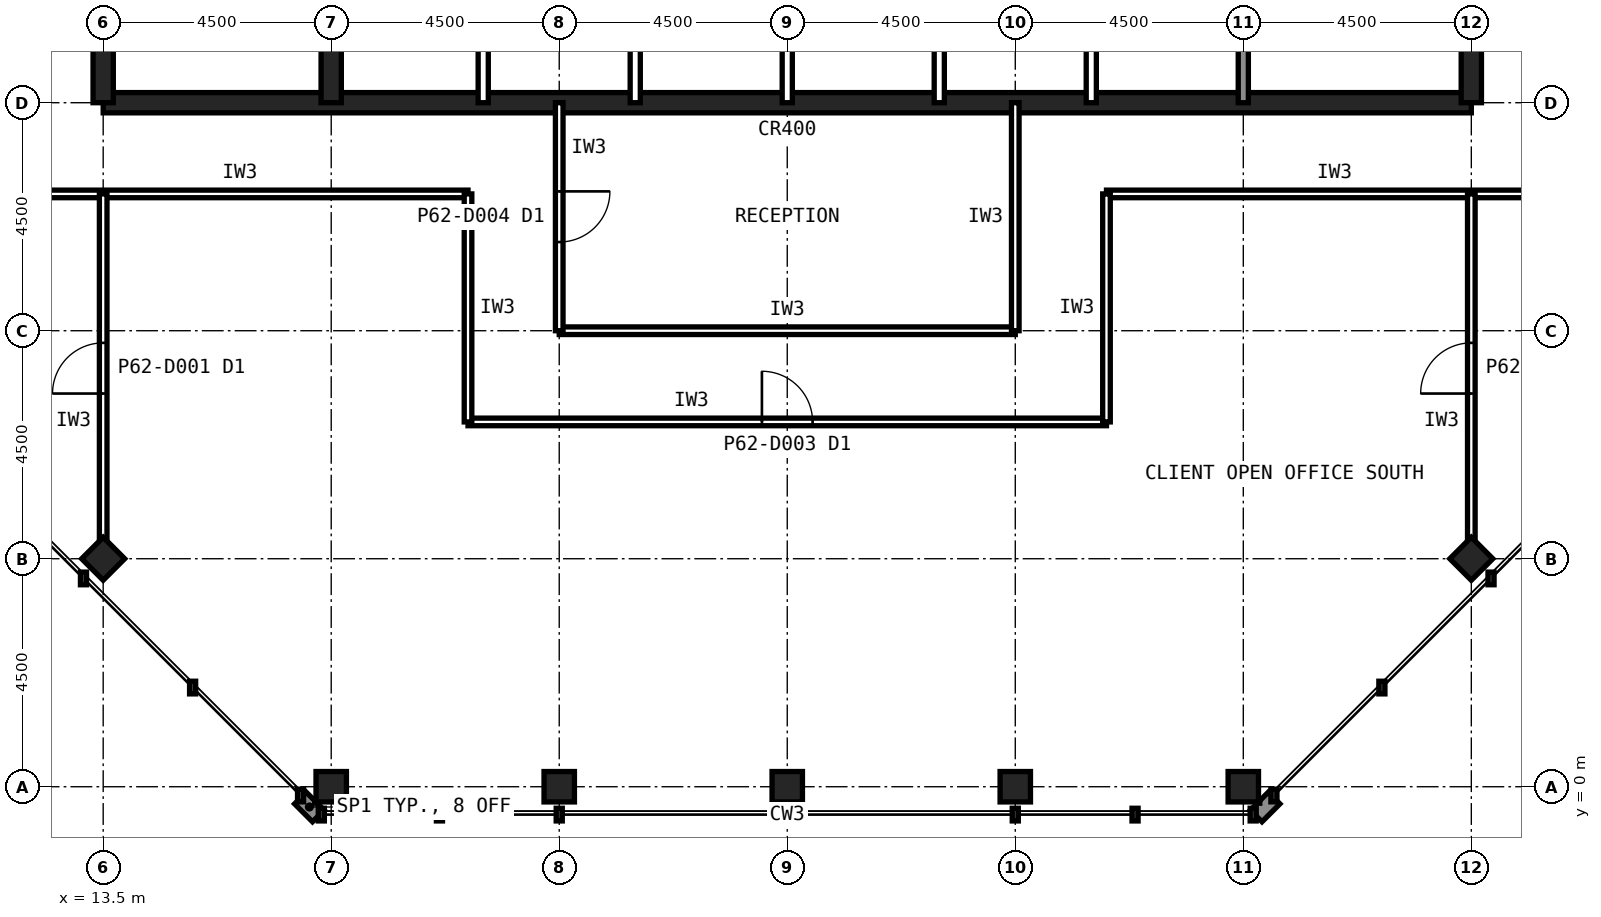
"""IFC4 building model, lengths in metres.
Left out: names, types, materials, properties, quantities, classifications, styles, units other than length and angle.
Written with IfcOpenShell. Run it as: python <this file> out.ifc"""

import sys

from ifc_helpers import new_model, si_unit, direction, frame, frame_2d, origin, origin_2d, place, context, subcontext, project, spatial, rectangle, hollow_rectangle, extrude, element, fill, save


model = new_model("IFC4")
c1 = context("Model", 3, precision=1e-05, world=origin(), true_north=direction((0.0, 1.0)))
c2 = subcontext(c1, "Body", "Model", "MODEL_VIEW")
j1 = project(units=[si_unit("LENGTHUNIT", "METRE"), si_unit("PLANEANGLEUNIT", "RADIAN")], contexts=[c1])
p1 = place(None, origin())
s1 = spatial("IfcSite", under=j1, at=p1, CompositionType="ELEMENT")
p2 = place(p1, origin())
s2 = spatial("IfcBuilding", under=s1, at=p2, CompositionType="ELEMENT")
p3 = place(p2, frame((0.0, 0.0, 262.6)))
s3 = spatial("IfcBuildingStorey", under=s2, at=p3, CompositionType="ELEMENT", Elevation=262.6)
for number, where, z_axis, x_axis in (
    (1, (18.0, 0.0, 0.0), (0.0, 0.0, 1.0), (1.0, 0.0, 0.0)),
    (2, (22.5, 0.0, 0.0), (0.0, 0.0, 1.0), (1.0, 0.0, 0.0)),
    (3, (27.0, 0.0, 0.0), (0.0, 0.0, 1.0), (1.0, 0.0, 0.0)),
    (4, (31.5, 0.0, 0.0), (0.0, 0.0, 1.0), (1.0, 0.0, 0.0)),
    (5, (36.0, 0.0, 0.0), (0.0, 0.0, 1.0), (1.0, 0.0, 0.0)),
    (6, (13.5, 4.5, 0.0), (0.0, 0.0, 1.0), (0.707, 0.707, 0.0)),
    (7, (40.5, 4.5, 0.0), (0.0, 0.0, 1.0), (0.707, 0.707, 0.0)),
):
    element("IfcColumn", number, at=place(p3, frame(where, z_axis=z_axis, x_axis=x_axis)), inside=s3, PredefinedType="COLUMN", context=c2, shape_type="SweptSolid", body=[
        extrude(hollow_rectangle(XDim=0.6, YDim=0.6, WallThickness=0.028, at=origin_2d()), origin(), (0.0, 0.0, 1.0), 4.0),
    ])
p4 = place(p3, frame((13.5, 13.5, 0.0), z_axis=(0.0, 0.0, 1.0), x_axis=(1.0, 0.0, 0.0)))
e8 = element("IfcWall", 8, at=p4, inside=s3, PredefinedType="SHEAR", context=c2, shape_type="SweptSolid", body=[
    extrude(rectangle(XDim=27.0, YDim=0.4, at=frame_2d((13.5, 0.0))), origin(), (0.0, 0.0, 1.0), 4.0),
])
p5 = place(p3, frame((40.5, 13.5, 0.0), z_axis=(0.0, 0.0, 1.0), x_axis=(0.0, 1.0, 0.0)))
e9 = element("IfcWall", 9, at=p5, inside=s3, PredefinedType="SHEAR", context=c2, shape_type="SweptSolid", body=[
    extrude(rectangle(XDim=27.0, YDim=0.4, at=frame_2d((13.5, 0.0))), origin(), (0.0, 0.0, 1.0), 4.0),
])
p6 = place(p5, frame((5.85, 0.0, 0.0)))
e10 = element("IfcOpeningElement", 10, at=p6, cuts=e9, PredefinedType="OPENING", context=c2, shape_type="SweptSolid", body=[
    extrude(rectangle(XDim=1.8, YDim=2.1, at=frame_2d((0.9, 1.05))), frame((0.0, 0.21, 0.0), z_axis=(0.0, -1.0, 0.0), x_axis=(1.0, 0.0, 0.0)), (0.0, 0.0, 1.0), 0.42),
])
p7 = place(p5, frame((19.65, 0.0, 0.0)))
e11 = element("IfcOpeningElement", 11, at=p7, cuts=e9, PredefinedType="OPENING", context=c2, shape_type="SweptSolid", body=[
    extrude(rectangle(XDim=1.2, YDim=2.1, at=frame_2d((0.6, 1.05))), frame((0.0, 0.21, 0.0), z_axis=(0.0, -1.0, 0.0), x_axis=(1.0, 0.0, 0.0)), (0.0, 0.0, 1.0), 0.42),
])
p8 = place(p3, frame((13.5, 40.5, 0.0), z_axis=(0.0, 0.0, 1.0), x_axis=(0.0, -1.0, 0.0)))
e12 = element("IfcWall", 12, at=p8, inside=s3, PredefinedType="SHEAR", context=c2, shape_type="SweptSolid", body=[
    extrude(rectangle(XDim=27.0, YDim=0.4, at=frame_2d((13.5, 0.0))), origin(), (0.0, 0.0, 1.0), 4.0),
])
p9 = place(p8, frame((19.65, 0.0, 0.0)))
e13 = element("IfcOpeningElement", 13, at=p9, cuts=e12, PredefinedType="OPENING", context=c2, shape_type="SweptSolid", body=[
    extrude(rectangle(XDim=1.2, YDim=2.1, at=frame_2d((0.6, 1.05))), frame((0.0, 0.21, 0.0), z_axis=(0.0, -1.0, 0.0), x_axis=(1.0, 0.0, 0.0)), (0.0, 0.0, 1.0), 0.42),
])
p10 = place(p8, frame((5.85, 0.0, 0.0)))
e14 = element("IfcOpeningElement", 14, at=p10, cuts=e12, PredefinedType="OPENING", context=c2, shape_type="SweptSolid", body=[
    extrude(rectangle(XDim=1.8, YDim=2.1, at=frame_2d((0.9, 1.05))), frame((0.0, 0.21, 0.0), z_axis=(0.0, -1.0, 0.0), x_axis=(1.0, 0.0, 0.0)), (0.0, 0.0, 1.0), 0.42),
])
p11 = place(p3, frame((18.0, 13.5, 0.0), z_axis=(0.0, 0.0, 1.0), x_axis=(0.0, 1.0, 0.0)))
e15 = element("IfcWall", 15, at=p11, inside=s3, PredefinedType="SHEAR", context=c2, shape_type="SweptSolid", body=[
    extrude(rectangle(XDim=18.0, YDim=0.4, at=frame_2d((9.0, 0.0))), origin(), (0.0, 0.0, 1.0), 4.0),
])
p12 = place(p3, frame((36.0, 13.5, 0.0), z_axis=(0.0, 0.0, 1.0), x_axis=(0.0, 1.0, 0.0)))
e16 = element("IfcWall", 16, at=p12, inside=s3, PredefinedType="SOLIDWALL", context=c2, shape_type="SweptSolid", body=[
    extrude(rectangle(XDim=4.5, YDim=0.2, at=frame_2d((2.25, 0.0))), origin(), (0.0, 0.0, 1.0), 3.84),
])
for number, where, z_axis, x_axis in (
    (17, (21.0, 13.5, 0.0), (0.0, 0.0, 1.0), (0.0, 1.0, 0.0)),
    (18, (24.0, 13.5, 0.0), (0.0, 0.0, 1.0), (0.0, 1.0, 0.0)),
    (19, (27.0, 13.5, 0.0), (0.0, 0.0, 1.0), (0.0, 1.0, 0.0)),
    (20, (30.0, 13.5, 0.0), (0.0, 0.0, 1.0), (0.0, 1.0, 0.0)),
    (21, (33.0, 13.5, 0.0), (0.0, 0.0, 1.0), (0.0, 1.0, 0.0)),
):
    element("IfcWall", number, at=place(p3, frame(where, z_axis=z_axis, x_axis=x_axis)), inside=s3, PredefinedType="PARTITIONING", context=c2, shape_type="SweptSolid", body=[
        extrude(rectangle(XDim=4.5, YDim=0.2, at=frame_2d((2.25, 0.0))), origin(), (0.0, 0.0, 1.0), 3.84),
    ])
p13 = place(p3, frame((20.7, 7.2, 0.0), z_axis=(0.0, 0.0, 1.0), x_axis=(1.0, 0.0, 0.0)))
e22 = element("IfcWall", 22, at=p13, inside=s3, PredefinedType="PARTITIONING", context=c2, shape_type="SweptSolid", body=[
    extrude(rectangle(XDim=12.6, YDim=0.15, at=frame_2d((6.3, 0.0))), origin(), (0.0, 0.0, 1.0), 3.84),
])
p14 = place(p13, frame((5.8, 0.0, 0.0)))
e23 = element("IfcOpeningElement", 23, at=p14, cuts=e22, PredefinedType="OPENING", context=c2, shape_type="SweptSolid", body=[
    extrude(rectangle(XDim=1.0, YDim=2.1, at=frame_2d((0.5, 1.05))), frame((0.0, 0.085, 0.0), z_axis=(0.0, -1.0, 0.0), x_axis=(1.0, 0.0, 0.0)), (0.0, 0.0, 1.0), 0.17),
])
for number, where, z_axis, x_axis in (
    (24, (11.7, 11.7, 0.0), (0.0, 0.0, 1.0), (1.0, 0.0, 0.0)),
    (25, (33.3, 11.7, 0.0), (0.0, 0.0, 1.0), (1.0, 0.0, 0.0)),
):
    element("IfcWall", number, at=place(p3, frame(where, z_axis=z_axis, x_axis=x_axis)), inside=s3, PredefinedType="PARTITIONING", context=c2, shape_type="SweptSolid", body=[
        extrude(rectangle(XDim=9.0, YDim=0.15, at=frame_2d((4.5, 0.0))), origin(), (0.0, 0.0, 1.0), 3.84),
    ])
for number, where, z_axis, x_axis in (
    (26, (20.7, 11.7, 0.0), (0.0, 0.0, 1.0), (0.0, -1.0, 0.0)),
    (27, (33.3, 7.2, 0.0), (0.0, 0.0, 1.0), (0.0, 1.0, 0.0)),
):
    element("IfcWall", number, at=place(p3, frame(where, z_axis=z_axis, x_axis=x_axis)), inside=s3, PredefinedType="PARTITIONING", context=c2, shape_type="SweptSolid", body=[
        extrude(rectangle(XDim=4.5, YDim=0.15, at=frame_2d((2.25, 0.0))), origin(), (0.0, 0.0, 1.0), 3.84),
    ])
p15 = place(p3, frame((22.5, 9.0, 0.0), z_axis=(0.0, 0.0, 1.0), x_axis=(1.0, 0.0, 0.0)))
e28 = element("IfcWall", 28, at=p15, inside=s3, PredefinedType="PARTITIONING", context=c2, shape_type="SweptSolid", body=[
    extrude(rectangle(XDim=9.0, YDim=0.15, at=frame_2d((4.5, 0.0))), origin(), (0.0, 0.0, 1.0), 3.84),
])
p16 = place(p3, frame((31.5, 9.0, 0.0), z_axis=(0.0, 0.0, 1.0), x_axis=(0.0, 1.0, 0.0)))
e29 = element("IfcWall", 29, at=p16, inside=s3, PredefinedType="PARTITIONING", context=c2, shape_type="SweptSolid", body=[
    extrude(rectangle(XDim=4.5, YDim=0.15, at=frame_2d((2.25, 0.0))), origin(), (0.0, 0.0, 1.0), 2.989),
])
p17 = place(p3, frame((22.5, 13.5, 0.0), z_axis=(0.0, 0.0, 1.0), x_axis=(0.0, -1.0, 0.0)))
e30 = element("IfcWall", 30, at=p17, inside=s3, PredefinedType="PARTITIONING", context=c2, shape_type="SweptSolid", body=[
    extrude(rectangle(XDim=4.5, YDim=0.15, at=frame_2d((2.25, 0.0))), origin(), (0.0, 0.0, 1.0), 2.989),
])
p18 = place(p17, frame((1.75, 0.0, 0.0)))
e31 = element("IfcOpeningElement", 31, at=p18, cuts=e30, PredefinedType="OPENING", context=c2, shape_type="SweptSolid", body=[
    extrude(rectangle(XDim=1.0, YDim=2.1, at=frame_2d((0.5, 1.05))), frame((0.0, 0.085, 0.0), z_axis=(0.0, -1.0, 0.0), x_axis=(1.0, 0.0, 0.0)), (0.0, 0.0, 1.0), 0.17),
])
p19 = place(p3, frame((40.5, 4.82, 0.0), z_axis=(0.0, 0.0, 1.0), x_axis=(0.0, 1.0, 0.0)))
e32 = element("IfcWall", 32, at=p19, inside=s3, PredefinedType="PARTITIONING", context=c2, shape_type="SweptSolid", body=[
    extrude(rectangle(XDim=6.88, YDim=0.15, at=frame_2d((3.44, 0.0))), origin(), (0.0, 0.0, 1.0), 2.989),
])
p20 = place(p19, frame((2.94, 0.0, 0.0)))
e33 = element("IfcOpeningElement", 33, at=p20, cuts=e32, PredefinedType="OPENING", context=c2, shape_type="SweptSolid", body=[
    extrude(rectangle(XDim=1.0, YDim=2.1, at=frame_2d((0.5, 1.05))), frame((0.0, 0.085, 0.0), z_axis=(0.0, -1.0, 0.0), x_axis=(1.0, 0.0, 0.0)), (0.0, 0.0, 1.0), 0.17),
])
p21 = place(p3, frame((13.5, 4.82, 0.0), z_axis=(0.0, 0.0, 1.0), x_axis=(0.0, 1.0, 0.0)))
e34 = element("IfcWall", 34, at=p21, inside=s3, PredefinedType="PARTITIONING", context=c2, shape_type="SweptSolid", body=[
    extrude(rectangle(XDim=6.88, YDim=0.15, at=frame_2d((3.44, 0.0))), origin(), (0.0, 0.0, 1.0), 2.989),
])
p22 = place(p21, frame((2.94, 0.0, 0.0)))
e35 = element("IfcOpeningElement", 35, at=p22, cuts=e34, PredefinedType="OPENING", context=c2, shape_type="SweptSolid", body=[
    extrude(rectangle(XDim=1.0, YDim=2.1, at=frame_2d((0.5, 1.05))), frame((0.0, 0.085, 0.0), z_axis=(0.0, -1.0, 0.0), x_axis=(1.0, 0.0, 0.0)), (0.0, 0.0, 1.0), 0.17),
])
p23 = place(p14, origin())
e36 = element("IfcDoor", 36, at=p23, inside=s3, OperationType="SINGLE_SWING_LEFT", PredefinedType="DOOR", context=c2, shape_type="SweptSolid", body=[
    extrude(rectangle(XDim=1.0, YDim=2.1, at=frame_2d((0.5, 1.05))), frame((0.0, 0.025, 0.0), z_axis=(0.0, -1.0, 0.0), x_axis=(1.0, 0.0, 0.0)), (0.0, 0.0, 1.0), 0.05),
])
fill(e23, e36)
p24 = place(p18, origin())
e37 = element("IfcDoor", 37, at=p24, inside=s3, OperationType="SINGLE_SWING_LEFT", PredefinedType="DOOR", context=c2, shape_type="SweptSolid", body=[
    extrude(rectangle(XDim=1.0, YDim=2.1, at=frame_2d((0.5, 1.05))), frame((0.0, 0.025, 0.0), z_axis=(0.0, -1.0, 0.0), x_axis=(1.0, 0.0, 0.0)), (0.0, 0.0, 1.0), 0.05),
])
fill(e31, e37)
p25 = place(p20, origin())
e38 = element("IfcDoor", 38, at=p25, inside=s3, OperationType="SINGLE_SWING_LEFT", PredefinedType="DOOR", context=c2, shape_type="SweptSolid", body=[
    extrude(rectangle(XDim=1.0, YDim=2.1, at=frame_2d((0.5, 1.05))), frame((0.0, 0.025, 0.0), z_axis=(0.0, -1.0, 0.0), x_axis=(1.0, 0.0, 0.0)), (0.0, 0.0, 1.0), 0.05),
])
fill(e33, e38)
p26 = place(p22, origin())
e39 = element("IfcDoor", 39, at=p26, inside=s3, OperationType="SINGLE_SWING_LEFT", PredefinedType="DOOR", context=c2, shape_type="SweptSolid", body=[
    extrude(rectangle(XDim=1.0, YDim=2.1, at=frame_2d((0.5, 1.05))), frame((0.0, 0.025, 0.0), z_axis=(0.0, -1.0, 0.0), x_axis=(1.0, 0.0, 0.0)), (0.0, 0.0, 1.0), 0.05),
])
fill(e35, e39)
save(model, sys.argv[1])
